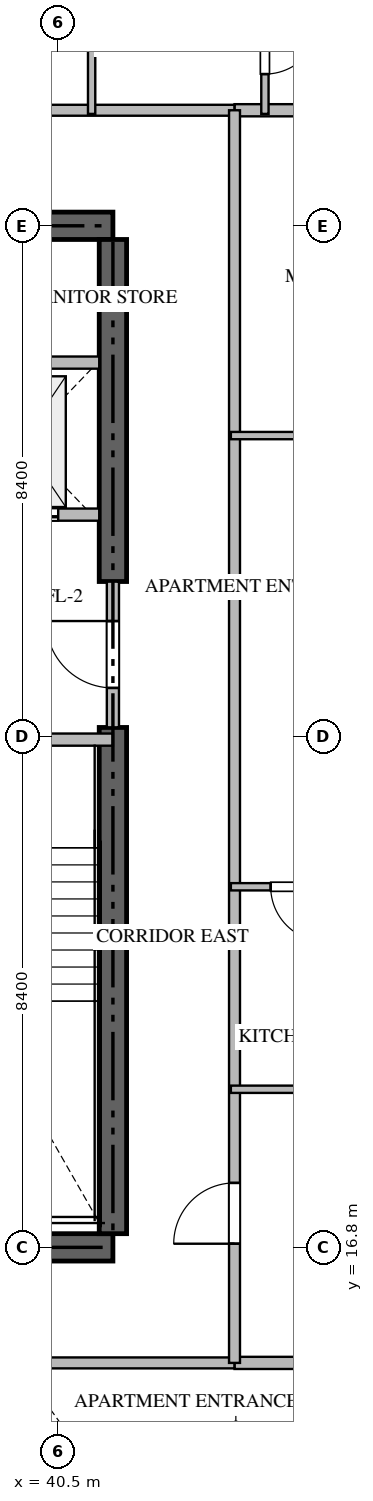
"""IFC4 building model, lengths in metres.
Left out: names, types, materials, properties, quantities, classifications, styles, units other than length and angle.
Written with IfcOpenShell. Run it as: python <this file> out.ifc"""

import sys

from ifc_helpers import new_model, si_unit, direction, frame, frame_2d, origin, place, context, subcontext, project, spatial, rectangle, extrude, source, transform, mapped, element, fill, save


model = new_model("IFC4")
c1 = context("Model", 3, precision=1e-05, world=origin(), true_north=direction((0.0, 1.0)))
c2 = subcontext(c1, "Body", "Model", "MODEL_VIEW")
j1 = project(units=[si_unit("LENGTHUNIT", "METRE"), si_unit("PLANEANGLEUNIT", "RADIAN")], contexts=[c1])
p1 = place(None, origin())
s1 = spatial("IfcSite", under=j1, at=p1, CompositionType="ELEMENT")
p2 = place(p1, origin())
s2 = spatial("IfcBuilding", under=s1, at=p2, CompositionType="ELEMENT")
p3 = place(p2, frame((0.0, 0.0, 79.2)))
s3 = spatial("IfcBuildingStorey", under=s2, at=p3, CompositionType="ELEMENT", Elevation=79.2)
for number, where, z_axis, x_axis in (
    (1, (23.4, 16.8, -0.26), (0.0, 0.0, 1.0), (1.0, 0.0, 0.0)),
    (2, (41.4, 33.6, -0.26), (0.0, 0.0, 1.0), (-1.0, 0.0, 0.0)),
):
    element("IfcWall", number, at=place(p3, frame(where, z_axis=z_axis, x_axis=x_axis)), inside=s3, PredefinedType="SHEAR", context=c2, shape_type="SweptSolid", body=[
        extrude(rectangle(XDim=18.0, YDim=0.45, at=frame_2d((9.0, 0.0))), origin(), (0.0, 0.0, 1.0), 3.748),
    ])
p4 = place(p3, frame((41.4, 17.025, -0.26), z_axis=(0.0, 0.0, 1.0), x_axis=(0.0, 1.0, 0.0)))
e3 = element("IfcWall", 3, at=p4, inside=s3, PredefinedType="SHEAR", context=c2, shape_type="SweptSolid", body=[
    extrude(rectangle(XDim=8.325, YDim=0.45, at=frame_2d((4.163, 0.0))), origin(), (0.0, 0.0, 1.0), 3.748),
])
p5 = place(p3, frame((41.4, 27.75, -0.26), z_axis=(0.0, 0.0, 1.0), x_axis=(0.0, 1.0, 0.0)))
e4 = element("IfcWall", 4, at=p5, inside=s3, PredefinedType="SHEAR", context=c2, shape_type="SweptSolid", body=[
    extrude(rectangle(XDim=5.625, YDim=0.45, at=frame_2d((2.812, 0.0))), origin(), (0.0, 0.0, 1.0), 3.748),
])
p6 = place(p3, frame((36.95, 25.15, 0.0), z_axis=(0.0, 0.0, 1.0), x_axis=(1.0, 0.0, 0.0)))
e5 = element("IfcWall", 5, at=p6, inside=s3, PredefinedType="STANDARD", context=c2, shape_type="SweptSolid", body=[
    extrude(rectangle(XDim=4.45, YDim=0.2, at=frame_2d((2.225, 0.0))), origin(), (0.0, 0.0, 1.0), 3.49),
])
p7 = place(p6, frame((1.65, 0.0, 0.0)))
e6 = element("IfcOpeningElement", 6, at=p7, cuts=e5, PredefinedType="OPENING", context=c2, shape_type="SweptSolid", body=[
    extrude(rectangle(XDim=1.1, YDim=2.15, at=frame_2d((0.55, 1.075))), frame((0.0, 0.11, 0.0), z_axis=(0.0, -1.0, 0.0), x_axis=(1.0, 0.0, 0.0)), (0.0, 0.0, 1.0), 0.22),
])
p8 = place(p3, frame((38.75, 28.85, 0.0), z_axis=(0.0, 0.0, 1.0), x_axis=(1.0, 0.0, 0.0)))
e7 = element("IfcWall", 7, at=p8, inside=s3, PredefinedType="STANDARD", context=c2, shape_type="SweptSolid", body=[
    extrude(rectangle(XDim=2.425, YDim=0.2, at=frame_2d((1.212, 0.0))), origin(), (0.0, 0.0, 1.0), 3.49),
])
p9 = place(p8, frame((0.55, 0.0, 0.0)))
e8 = element("IfcOpeningElement", 8, at=p9, cuts=e7, PredefinedType="OPENING", context=c2, shape_type="SweptSolid", body=[
    extrude(rectangle(XDim=1.2, YDim=2.2, at=frame_2d((0.6, 1.1))), frame((0.0, 0.11, 0.0), z_axis=(0.0, -1.0, 0.0), x_axis=(1.0, 0.0, 0.0)), (0.0, 0.0, 1.0), 0.22),
])
p10 = place(p3, frame((38.75, 31.35, 0.0), z_axis=(0.0, 0.0, 1.0), x_axis=(1.0, 0.0, 0.0)))
e9 = element("IfcWall", 9, at=p10, inside=s3, PredefinedType="STANDARD", context=c2, shape_type="SweptSolid", body=[
    extrude(rectangle(XDim=2.425, YDim=0.2, at=frame_2d((1.212, 0.0))), origin(), (0.0, 0.0, 1.0), 3.49),
])
p11 = place(p3, frame((41.4, 25.352, 0.0), z_axis=(0.0, 0.0, 1.0), x_axis=(0.0, 1.0, 0.0)))
e10 = element("IfcWall", 10, at=p11, inside=s3, PredefinedType="STANDARD", context=c2, shape_type="SweptSolid", body=[
    extrude(rectangle(XDim=2.396, YDim=0.2, at=frame_2d((1.198, 0.0))), origin(), (0.0, 0.0, 1.0), 3.49),
])
p12 = place(p11, frame((0.648, 0.0, 0.0)))
e11 = element("IfcOpeningElement", 11, at=p12, cuts=e10, PredefinedType="OPENING", context=c2, shape_type="SweptSolid", body=[
    extrude(rectangle(XDim=1.1, YDim=2.15, at=frame_2d((0.55, 1.075))), frame((0.0, 0.11, 0.0), z_axis=(0.0, -1.0, 0.0), x_axis=(1.0, 0.0, 0.0)), (0.0, 0.0, 1.0), 0.22),
])
for number, where, z_axis, x_axis in (
    (12, (43.4, 14.9, 0.0), (0.0, 0.0, 1.0), (1.0, 0.0, 0.0)),
    (13, (43.4, 35.5, 0.0), (0.0, 0.0, 1.0), (1.0, 0.0, 0.0)),
):
    element("IfcWall", number, at=place(p3, frame(where, z_axis=z_axis, x_axis=x_axis)), inside=s3, PredefinedType="PARTITIONING", context=c2, shape_type="SweptSolid", body=[
        extrude(rectangle(XDim=15.318, YDim=0.2, at=frame_2d((7.659, 0.0))), origin(), (0.0, 0.0, 1.0), 3.49),
    ])
p13 = place(p3, frame((21.402, 14.9, 0.0), z_axis=(0.0, 0.0, 1.0), x_axis=(1.0, 0.0, 0.0)))
e14 = element("IfcWall", 14, at=p13, inside=s3, PredefinedType="PARTITIONING", context=c2, shape_type="SweptSolid", body=[
    extrude(rectangle(XDim=21.996, YDim=0.18, at=frame_2d((10.998, 0.0))), origin(), (0.0, 0.0, 1.0), 3.49),
])
p14 = place(p13, frame((4.724, 0.0, 0.0)))
e15 = element("IfcOpeningElement", 15, at=p14, cuts=e14, PredefinedType="OPENING", context=c2, shape_type="SweptSolid", body=[
    extrude(rectangle(XDim=1.0, YDim=2.15, at=frame_2d((0.5, 1.075))), frame((0.0, 0.1, 0.0), z_axis=(0.0, -1.0, 0.0), x_axis=(1.0, 0.0, 0.0)), (0.0, 0.0, 1.0), 0.2),
])
p15 = place(p13, frame((10.498, 0.0, 0.0)))
e16 = element("IfcOpeningElement", 16, at=p15, cuts=e14, PredefinedType="OPENING", context=c2, shape_type="SweptSolid", body=[
    extrude(rectangle(XDim=1.0, YDim=2.15, at=frame_2d((0.5, 1.075))), frame((0.0, 0.1, 0.0), z_axis=(0.0, -1.0, 0.0), x_axis=(1.0, 0.0, 0.0)), (0.0, 0.0, 1.0), 0.2),
])
p16 = place(p3, frame((21.402, 35.5, 0.0), z_axis=(0.0, 0.0, 1.0), x_axis=(1.0, 0.0, 0.0)))
e17 = element("IfcWall", 17, at=p16, inside=s3, PredefinedType="PARTITIONING", context=c2, shape_type="SweptSolid", body=[
    extrude(rectangle(XDim=21.996, YDim=0.18, at=frame_2d((10.998, 0.0))), origin(), (0.0, 0.0, 1.0), 3.49),
])
p17 = place(p16, frame((10.498, 0.0, 0.0)))
e18 = element("IfcOpeningElement", 18, at=p17, cuts=e17, PredefinedType="OPENING", context=c2, shape_type="SweptSolid", body=[
    extrude(rectangle(XDim=1.0, YDim=2.15, at=frame_2d((0.5, 1.075))), frame((0.0, 0.1, 0.0), z_axis=(0.0, -1.0, 0.0), x_axis=(1.0, 0.0, 0.0)), (0.0, 0.0, 1.0), 0.2),
])
p18 = place(p16, frame((16.272, 0.0, 0.0)))
e19 = element("IfcOpeningElement", 19, at=p18, cuts=e17, PredefinedType="OPENING", context=c2, shape_type="SweptSolid", body=[
    extrude(rectangle(XDim=1.0, YDim=2.15, at=frame_2d((0.5, 1.075))), frame((0.0, 0.1, 0.0), z_axis=(0.0, -1.0, 0.0), x_axis=(1.0, 0.0, 0.0)), (0.0, 0.0, 1.0), 0.2),
])
p19 = place(p3, frame((43.4, 14.9, 0.0), z_axis=(0.0, 0.0, 1.0), x_axis=(0.0, 1.0, 0.0)))
e20 = element("IfcWall", 20, at=p19, inside=s3, PredefinedType="PARTITIONING", context=c2, shape_type="SweptSolid", body=[
    extrude(rectangle(XDim=20.6, YDim=0.18, at=frame_2d((10.3, 0.0))), origin(), (0.0, 0.0, 1.0), 3.49),
])
p20 = place(p19, frame((1.96, 0.0, 0.0)))
e21 = element("IfcOpeningElement", 21, at=p20, cuts=e20, PredefinedType="OPENING", context=c2, shape_type="SweptSolid", body=[
    extrude(rectangle(XDim=1.0, YDim=2.15, at=frame_2d((0.5, 1.075))), frame((0.0, 0.1, 0.0), z_axis=(0.0, -1.0, 0.0), x_axis=(1.0, 0.0, 0.0)), (0.0, 0.0, 1.0), 0.2),
])
p21 = place(p3, frame((41.05, 38.25, 0.0), z_axis=(0.0, 0.0, 1.0), x_axis=(0.0, -1.0, 0.0)))
e22 = element("IfcWall", 22, at=p21, inside=s3, PredefinedType="PARTITIONING", context=c2, shape_type="SweptSolid", body=[
    extrude(rectangle(XDim=2.81, YDim=0.12, at=frame_2d((1.405, 0.0))), origin(), (0.0, 0.0, 1.0), 3.49),
])
p22 = place(p3, frame((43.9, 37.65, 0.0), z_axis=(0.0, 0.0, 1.0), x_axis=(0.0, -1.0, 0.0)))
e23 = element("IfcWall", 23, at=p22, inside=s3, PredefinedType="PARTITIONING", context=c2, shape_type="SweptSolid", body=[
    extrude(rectangle(XDim=2.21, YDim=0.12, at=frame_2d((1.105, 0.0))), origin(), (0.0, 0.0, 1.0), 3.49),
])
p23 = place(p22, frame((0.655, 0.0, 0.0)))
e24 = element("IfcOpeningElement", 24, at=p23, cuts=e23, PredefinedType="OPENING", context=c2, shape_type="SweptSolid", body=[
    extrude(rectangle(XDim=0.9, YDim=2.1, at=frame_2d((0.45, 1.05))), frame((0.0, 0.07, 0.0), z_axis=(0.0, -1.0, 0.0), x_axis=(1.0, 0.0, 0.0)), (0.0, 0.0, 1.0), 0.14),
])
p24 = place(p3, frame((46.15, 19.4, 0.0), z_axis=(0.0, 0.0, 1.0), x_axis=(-1.0, 0.0, 0.0)))
e25 = element("IfcWall", 25, at=p24, inside=s3, PredefinedType="PARTITIONING", context=c2, shape_type="SweptSolid", body=[
    extrude(rectangle(XDim=2.81, YDim=0.12, at=frame_2d((1.405, 0.0))), origin(), (0.0, 0.0, 1.0), 3.49),
])
p25 = place(p3, frame((45.55, 22.73, 0.0), z_axis=(0.0, 0.0, 1.0), x_axis=(-1.0, 0.0, 0.0)))
e26 = element("IfcWall", 26, at=p25, inside=s3, PredefinedType="PARTITIONING", context=c2, shape_type="SweptSolid", body=[
    extrude(rectangle(XDim=2.21, YDim=0.12, at=frame_2d((1.105, 0.0))), origin(), (0.0, 0.0, 1.0), 3.49),
])
p26 = place(p25, frame((0.655, 0.0, 0.0)))
e27 = element("IfcOpeningElement", 27, at=p26, cuts=e26, PredefinedType="OPENING", context=c2, shape_type="SweptSolid", body=[
    extrude(rectangle(XDim=0.9, YDim=2.1, at=frame_2d((0.45, 1.05))), frame((0.0, 0.07, 0.0), z_axis=(0.0, -1.0, 0.0), x_axis=(1.0, 0.0, 0.0)), (0.0, 0.0, 1.0), 0.14),
])
p27 = place(p3, frame((45.548, 30.15, 0.0), z_axis=(0.0, 0.0, 1.0), x_axis=(-1.0, 0.0, 0.0)))
e28 = element("IfcWall", 28, at=p27, inside=s3, PredefinedType="PARTITIONING", context=c2, shape_type="SweptSolid", body=[
    extrude(rectangle(XDim=2.208, YDim=0.12, at=frame_2d((1.104, 0.0))), origin(), (0.0, 0.0, 1.0), 3.49),
])
m1 = source(origin(), c2, "Body", "SweptSolid", [
    extrude(rectangle(XDim=1.2, YDim=2.2, at=frame_2d((0.6, 1.1))), frame((0.0, 0.025, 0.0), z_axis=(0.0, -1.0, 0.0), x_axis=(1.0, 0.0, 0.0)), (0.0, 0.0, 1.0), 0.05),
])
p28 = place(p9, origin())
e29 = element("IfcDoor", 29, at=p28, inside=s3, OperationType="DOUBLE_DOOR_SLIDING", PredefinedType="DOOR", context=c2, shape_type="MappedRepresentation", body=[
    mapped(m1, transform((0.0, 0.0, 0.0), scale=1.0)),
])
fill(e8, e29)
m2 = source(origin(), c2, "Body", "SweptSolid", [
    extrude(rectangle(XDim=1.1, YDim=2.15, at=frame_2d((0.55, 1.075))), frame((0.0, 0.025, 0.0), z_axis=(0.0, -1.0, 0.0), x_axis=(1.0, 0.0, 0.0)), (0.0, 0.0, 1.0), 0.05),
])
p29 = place(p12, origin())
e30 = element("IfcDoor", 30, at=p29, inside=s3, OperationType="SINGLE_SWING_RIGHT", PredefinedType="DOOR", context=c2, shape_type="MappedRepresentation", body=[
    mapped(m2, transform((0.0, 0.0, 0.0), scale=1.0)),
])
fill(e11, e30)
m3 = source(origin(), c2, "Body", "SweptSolid", [
    extrude(rectangle(XDim=1.0, YDim=2.15, at=frame_2d((0.5, 1.075))), frame((0.0, 0.025, 0.0), z_axis=(0.0, -1.0, 0.0), x_axis=(1.0, 0.0, 0.0)), (0.0, 0.0, 1.0), 0.05),
])
p30 = place(p20, origin())
e31 = element("IfcDoor", 31, at=p30, inside=s3, OperationType="SINGLE_SWING_LEFT", PredefinedType="DOOR", context=c2, shape_type="MappedRepresentation", body=[
    mapped(m3, transform((0.0, 0.0, 0.0), scale=1.0)),
])
fill(e21, e31)
m4 = source(origin(), c2, "Body", "SweptSolid", [
    extrude(rectangle(XDim=0.9, YDim=2.1, at=frame_2d((0.45, 1.05))), frame((0.0, 0.025, 0.0), z_axis=(0.0, -1.0, 0.0), x_axis=(1.0, 0.0, 0.0)), (0.0, 0.0, 1.0), 0.05),
])
p31 = place(p23, origin())
e32 = element("IfcDoor", 32, at=p31, inside=s3, OperationType="SINGLE_SWING_LEFT", PredefinedType="DOOR", context=c2, shape_type="MappedRepresentation", body=[
    mapped(m4, transform((0.0, 0.0, 0.0), scale=1.0)),
])
fill(e24, e32)
p32 = place(p26, origin())
e33 = element("IfcDoor", 33, at=p32, inside=s3, OperationType="SINGLE_SWING_LEFT", PredefinedType="DOOR", context=c2, shape_type="MappedRepresentation", body=[
    mapped(m4, transform((0.0, 0.0, 0.0), scale=1.0)),
])
fill(e27, e33)
save(model, sys.argv[1])
